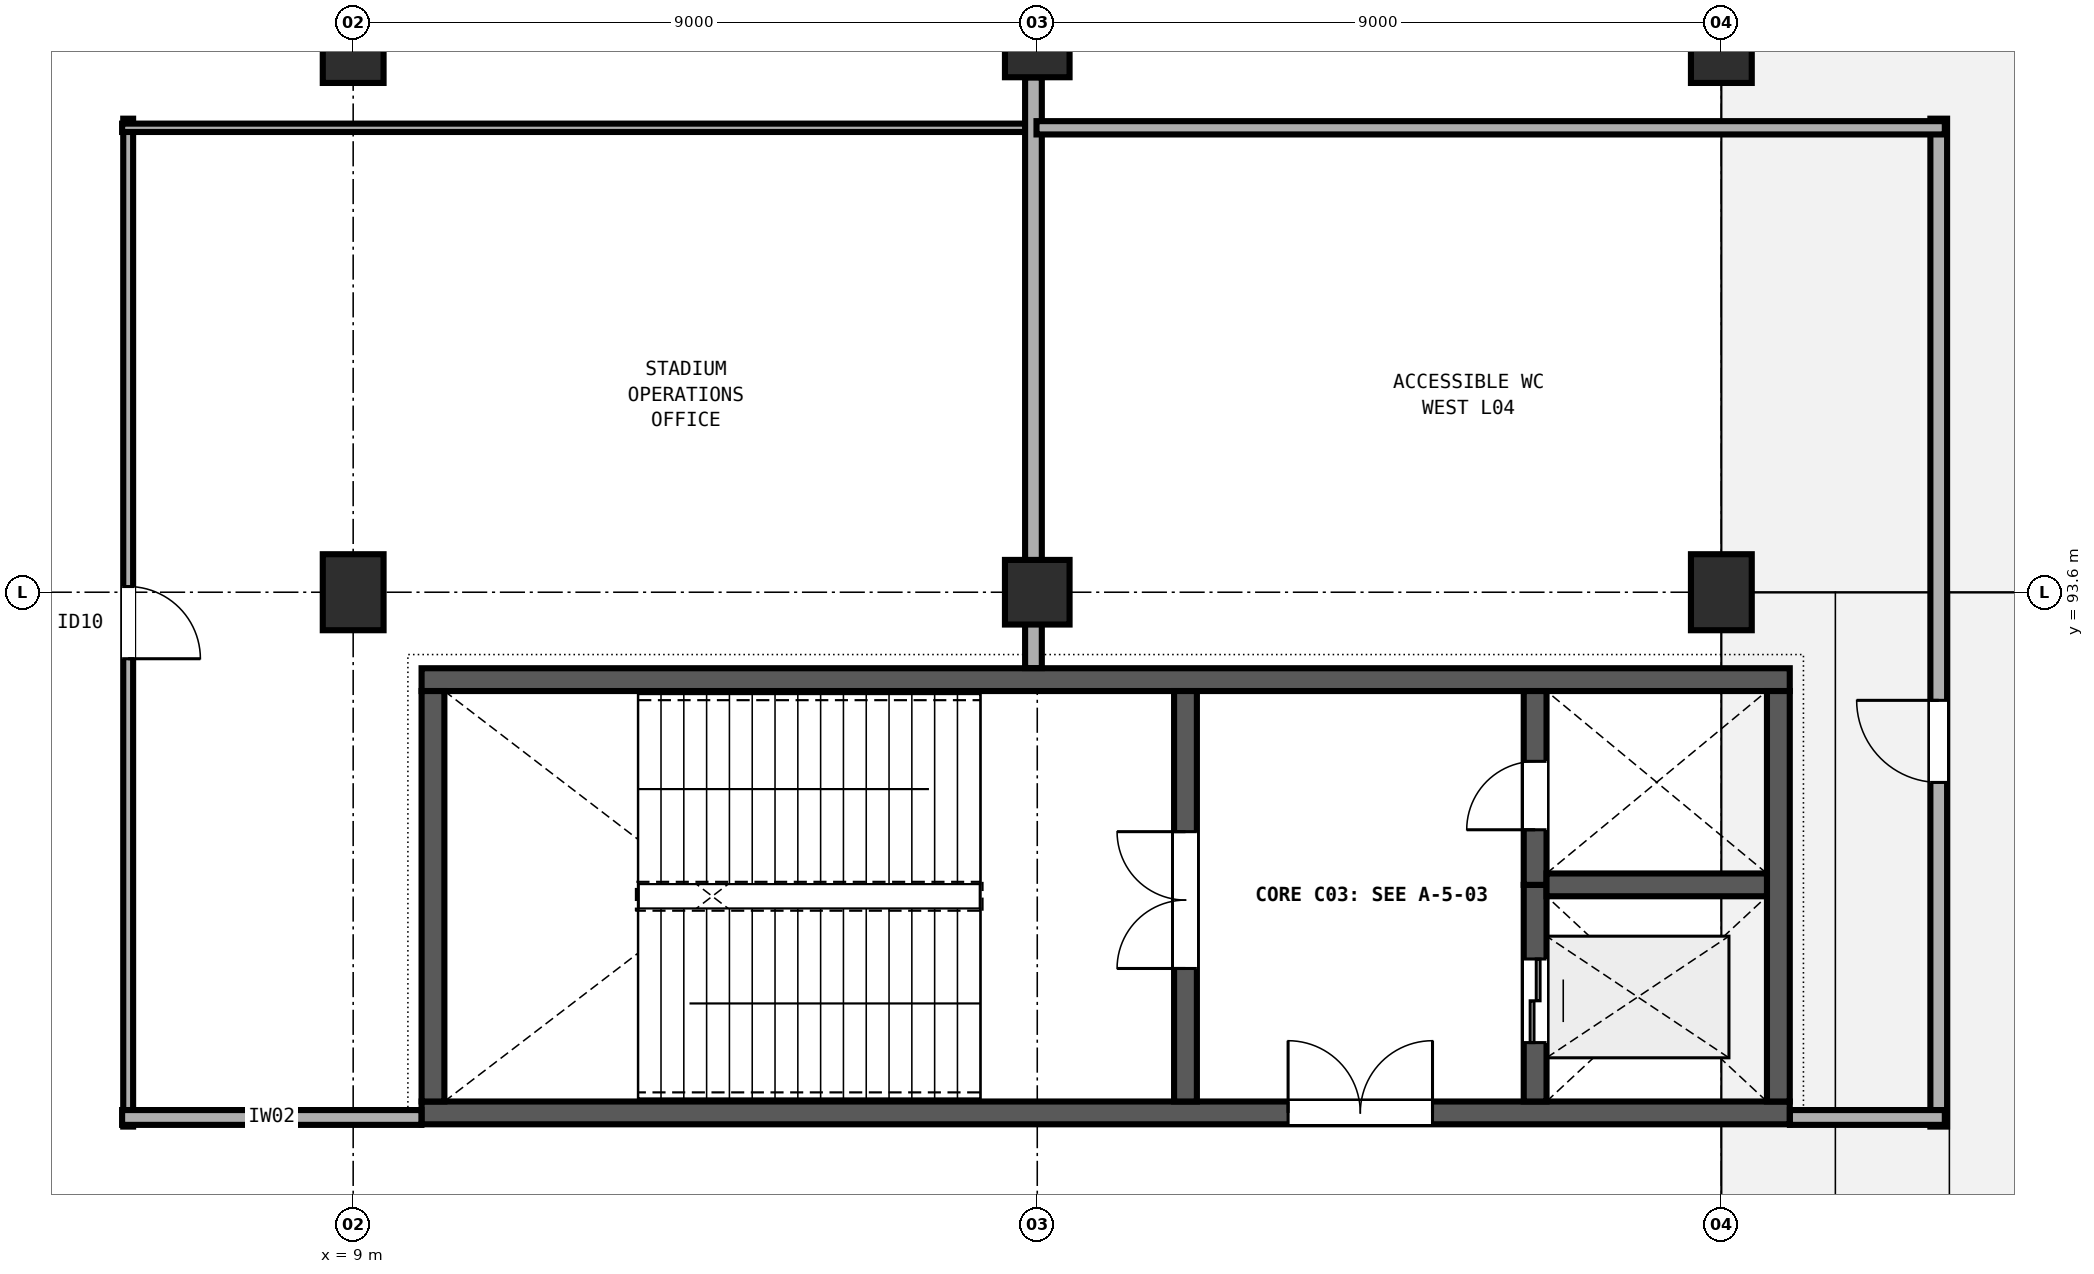
"""IFC4 building model, lengths in metres.
Left out: names, types, materials, properties, quantities, classifications, styles, units other than length and angle.
Written with IfcOpenShell. Run it as: python <this file> out.ifc"""

import sys

from ifc_helpers import new_model, si_unit, direction, frame, frame_2d, origin, origin_2d, place, context, subcontext, project, spatial, rectangle, extrude, element, fill, save


model = new_model("IFC4")
c1 = context("Model", 3, precision=1e-05, world=origin(), true_north=direction((0.0, 1.0)))
c2 = subcontext(c1, "Body", "Model", "MODEL_VIEW")
j1 = project(units=[si_unit("LENGTHUNIT", "METRE"), si_unit("PLANEANGLEUNIT", "RADIAN")], contexts=[c1])
p1 = place(None, origin())
s1 = spatial("IfcSite", under=j1, at=p1, CompositionType="ELEMENT")
p2 = place(p1, origin())
s2 = spatial("IfcBuilding", under=s1, at=p2, CompositionType="ELEMENT")
p3 = place(p2, frame((0.0, 0.0, 19.2)))
s3 = spatial("IfcBuildingStorey", under=s2, at=p3, CompositionType="ELEMENT", Elevation=19.2)
for number, where, z_axis, x_axis in (
    (1, (9.0, 93.6, 0.0), (0.0, 0.0, 1.0), (1.0, 0.0, 0.0)),
    (2, (9.0, 100.8, 0.0), (0.0, 0.0, 1.0), (1.0, 0.0, 0.0)),
):
    element("IfcColumn", number, at=place(p3, frame(where, z_axis=z_axis, x_axis=x_axis)), inside=s3, PredefinedType="COLUMN", context=c2, shape_type="SweptSolid", body=[
        extrude(rectangle(XDim=0.8, YDim=1.0, at=origin_2d()), origin(), (0.0, 0.0, 1.0), 4.8),
    ])
for number, where, z_axis, x_axis in (
    (3, (18.0, 93.6, 0.0), (0.0, 0.0, 1.0), (1.0, 0.0, 0.0)),
    (4, (18.0, 100.8, 0.0), (0.0, 0.0, 1.0), (1.0, 0.0, 0.0)),
):
    element("IfcColumn", number, at=place(p3, frame(where, z_axis=z_axis, x_axis=x_axis)), inside=s3, PredefinedType="COLUMN", context=c2, shape_type="SweptSolid", body=[
        extrude(rectangle(XDim=0.85, YDim=0.85, at=origin_2d()), origin(), (0.0, 0.0, 1.0), 4.8),
    ])
for number, where, z_axis, x_axis in (
    (5, (27.0, 93.6, 0.0), (0.0, 0.0, 1.0), (1.0, 0.0, 0.0)),
    (6, (27.0, 100.8, 0.0), (0.0, 0.0, 1.0), (1.0, 0.0, 0.0)),
):
    element("IfcColumn", number, at=place(p3, frame(where, z_axis=z_axis, x_axis=x_axis)), inside=s3, PredefinedType="COLUMN", context=c2, shape_type="SweptSolid", body=[
        extrude(rectangle(XDim=0.8, YDim=1.0, at=origin_2d()), origin(), (0.0, 0.0, 1.0), 4.8),
    ])
p4 = place(p3, frame((9.9, 86.75, 0.0), z_axis=(0.0, 0.0, 1.0), x_axis=(1.0, 0.0, 0.0)))
e7 = element("IfcWall", 7, at=p4, inside=s3, PredefinedType="SHEAR", context=c2, shape_type="SweptSolid", body=[
    extrude(rectangle(XDim=18.0, YDim=0.3, at=frame_2d((9.0, 0.0))), origin(), (0.0, 0.0, 1.0), 4.55),
])
p5 = place(p4, frame((11.4, 0.0, 0.0)))
e8 = element("IfcOpeningElement", 8, at=p5, cuts=e7, PredefinedType="OPENING", context=c2, shape_type="SweptSolid", body=[
    extrude(rectangle(XDim=1.9, YDim=2.25, at=frame_2d((0.95, 1.125))), frame((0.0, 0.16, 0.0), z_axis=(0.0, -1.0, 0.0), x_axis=(1.0, 0.0, 0.0)), (0.0, 0.0, 1.0), 0.32),
])
p6 = place(p3, frame((27.9, 92.45, 0.0), z_axis=(0.0, 0.0, 1.0), x_axis=(-1.0, 0.0, 0.0)))
e9 = element("IfcWall", 9, at=p6, inside=s3, PredefinedType="SHEAR", context=c2, shape_type="SweptSolid", body=[
    extrude(rectangle(XDim=18.0, YDim=0.3, at=frame_2d((9.0, 0.0))), origin(), (0.0, 0.0, 1.0), 4.55),
])
for number, where, z_axis, x_axis in (
    (10, (10.05, 92.3, 0.0), (0.0, 0.0, 1.0), (0.0, -1.0, 0.0)),
    (11, (27.75, 86.9, 0.0), (0.0, 0.0, 1.0), (0.0, 1.0, 0.0)),
):
    element("IfcWall", number, at=place(p3, frame(where, z_axis=z_axis, x_axis=x_axis)), inside=s3, PredefinedType="SHEAR", context=c2, shape_type="SweptSolid", body=[
        extrude(rectangle(XDim=5.4, YDim=0.3, at=frame_2d((2.7, 0.0))), origin(), (0.0, 0.0, 1.0), 4.55),
    ])
p7 = place(p3, frame((19.95, 86.9, 0.0), z_axis=(0.0, 0.0, 1.0), x_axis=(0.0, 1.0, 0.0)))
e12 = element("IfcWall", 12, at=p7, inside=s3, PredefinedType="SHEAR", context=c2, shape_type="SweptSolid", body=[
    extrude(rectangle(XDim=5.4, YDim=0.3, at=frame_2d((2.7, 0.0))), origin(), (0.0, 0.0, 1.0), 4.55),
])
p8 = place(p7, frame((1.75, 0.0, 0.0)))
e13 = element("IfcOpeningElement", 13, at=p8, cuts=e12, PredefinedType="OPENING", context=c2, shape_type="SweptSolid", body=[
    extrude(rectangle(XDim=1.8, YDim=2.25, at=frame_2d((0.9, 1.125))), frame((0.0, 0.16, 0.0), z_axis=(0.0, -1.0, 0.0), x_axis=(1.0, 0.0, 0.0)), (0.0, 0.0, 1.0), 0.32),
])
p9 = place(p3, frame((24.55, 86.9, 0.0), z_axis=(0.0, 0.0, 1.0), x_axis=(0.0, 1.0, 0.0)))
e14 = element("IfcWall", 14, at=p9, inside=s3, PredefinedType="SHEAR", context=c2, shape_type="SweptSolid", body=[
    extrude(rectangle(XDim=2.85, YDim=0.3, at=frame_2d((1.425, 0.0))), origin(), (0.0, 0.0, 1.0), 4.55),
])
p10 = place(p9, frame((0.775, 0.0, 0.0)))
e15 = element("IfcOpeningElement", 15, at=p10, cuts=e14, PredefinedType="OPENING", context=c2, shape_type="SweptSolid", body=[
    extrude(rectangle(XDim=1.1, YDim=2.1, at=frame_2d((0.55, 1.05))), frame((0.0, 0.16, 0.0), z_axis=(0.0, -1.0, 0.0), x_axis=(1.0, 0.0, 0.0)), (0.0, 0.0, 1.0), 0.32),
])
p11 = place(p3, frame((24.55, 89.75, 0.0), z_axis=(0.0, 0.0, 1.0), x_axis=(0.0, 1.0, 0.0)))
e16 = element("IfcWall", 16, at=p11, inside=s3, PredefinedType="SHEAR", context=c2, shape_type="SweptSolid", body=[
    extrude(rectangle(XDim=2.55, YDim=0.3, at=frame_2d((1.275, 0.0))), origin(), (0.0, 0.0, 1.0), 4.55),
])
p12 = place(p11, frame((0.725, 0.0, 0.0)))
e17 = element("IfcOpeningElement", 17, at=p12, cuts=e16, PredefinedType="OPENING", context=c2, shape_type="SweptSolid", body=[
    extrude(rectangle(XDim=0.9, YDim=2.1, at=frame_2d((0.45, 1.05))), frame((0.0, 0.16, 0.0), z_axis=(0.0, -1.0, 0.0), x_axis=(1.0, 0.0, 0.0)), (0.0, 0.0, 1.0), 0.32),
])
p13 = place(p3, frame((24.7, 89.75, 0.0), z_axis=(0.0, 0.0, 1.0), x_axis=(1.0, 0.0, 0.0)))
e18 = element("IfcWall", 18, at=p13, inside=s3, PredefinedType="SHEAR", context=c2, shape_type="SweptSolid", body=[
    extrude(rectangle(XDim=2.9, YDim=0.3, at=frame_2d((1.45, 0.0))), origin(), (0.0, 0.0, 1.0), 4.55),
])
p14 = place(p3, frame((6.04, 99.83, 0.0), z_axis=(0.0, 0.0, 1.0), x_axis=(0.0, -1.0, 0.0)))
e19 = element("IfcWall", 19, at=p14, inside=s3, PredefinedType="PARTITIONING", context=c2, shape_type="SweptSolid", body=[
    extrude(rectangle(XDim=13.26, YDim=0.13, at=frame_2d((6.63, 0.0))), origin(), (0.0, 0.0, 1.0), 3.28),
])
p15 = place(p14, frame((6.155, 0.0, 0.0)))
e20 = element("IfcOpeningElement", 20, at=p15, cuts=e19, PredefinedType="OPENING", context=c2, shape_type="SweptSolid", body=[
    extrude(rectangle(XDim=0.95, YDim=2.18, at=frame_2d((0.475, 1.09))), frame((0.0, 0.075, 0.0), z_axis=(0.0, -1.0, 0.0), x_axis=(1.0, 0.0, 0.0)), (0.0, 0.0, 1.0), 0.15),
])
p16 = place(p3, frame((5.96, 99.71, 0.0), z_axis=(0.0, 0.0, 1.0), x_axis=(1.0, 0.0, 0.0)))
e21 = element("IfcWall", 21, at=p16, inside=s3, PredefinedType="PARTITIONING", context=c2, shape_type="SweptSolid", body=[
    extrude(rectangle(XDim=11.95, YDim=0.11, at=frame_2d((5.975, 0.0))), origin(), (0.0, 0.0, 1.0), 3.28),
])
p17 = place(p3, frame((17.95, 100.373, 0.0), z_axis=(0.0, 0.0, 1.0), x_axis=(0.0, -1.0, 0.0)))
e22 = element("IfcWall", 22, at=p17, inside=s3, PredefinedType="PARTITIONING", context=c2, shape_type="SweptSolid", body=[
    extrude(rectangle(XDim=7.771, YDim=0.22, at=frame_2d((3.885, 0.0))), origin(), (0.0, 0.0, 1.0), 3.28),
])
p18 = place(p3, frame((9.898, 86.69, 0.0), z_axis=(0.0, 0.0, 1.0), x_axis=(-1.0, 0.0, 0.0)))
e23 = element("IfcWall", 23, at=p18, inside=s3, PredefinedType="PARTITIONING", context=c2, shape_type="SweptSolid", body=[
    extrude(rectangle(XDim=3.938, YDim=0.195, at=frame_2d((1.969, 0.0))), origin(), (0.0, 0.0, 1.0), 3.28),
])
p19 = place(p3, frame((29.86, 86.57, 0.0), z_axis=(0.0, 0.0, 1.0), x_axis=(0.0, 1.0, 0.0)))
e24 = element("IfcWall", 24, at=p19, inside=s3, PredefinedType="PARTITIONING", context=c2, shape_type="SweptSolid", body=[
    extrude(rectangle(XDim=13.26, YDim=0.22, at=frame_2d((6.63, 0.0))), origin(), (0.0, 0.0, 1.0), 3.28),
])
p20 = place(p19, frame((4.528, 0.0, 0.0)))
e25 = element("IfcOpeningElement", 25, at=p20, cuts=e24, PredefinedType="OPENING", context=c2, shape_type="SweptSolid", body=[
    extrude(rectangle(XDim=1.08, YDim=2.18, at=frame_2d((0.54, 1.09))), frame((0.0, 0.12, 0.0), z_axis=(0.0, -1.0, 0.0), x_axis=(1.0, 0.0, 0.0)), (0.0, 0.0, 1.0), 0.24),
])
p21 = place(p3, frame((29.94, 86.69, 0.0), z_axis=(0.0, 0.0, 1.0), x_axis=(-1.0, 0.0, 0.0)))
e26 = element("IfcWall", 26, at=p21, inside=s3, PredefinedType="PARTITIONING", context=c2, shape_type="SweptSolid", body=[
    extrude(rectangle(XDim=2.038, YDim=0.195, at=frame_2d((1.019, 0.0))), origin(), (0.0, 0.0, 1.0), 3.28),
])
p22 = place(p3, frame((17.99, 99.71, 0.0), z_axis=(0.0, 0.0, 1.0), x_axis=(1.0, 0.0, 0.0)))
e27 = element("IfcWall", 27, at=p22, inside=s3, PredefinedType="PARTITIONING", context=c2, shape_type="SweptSolid", body=[
    extrude(rectangle(XDim=11.95, YDim=0.175, at=frame_2d((5.975, 0.0))), origin(), (0.0, 0.0, 1.0), 3.28),
])
p23 = place(p8, origin())
e28 = element("IfcDoor", 28, at=p23, inside=s3, OperationType="DOUBLE_DOOR_SINGLE_SWING", PredefinedType="DOOR", context=c2, shape_type="SweptSolid", body=[
    extrude(rectangle(XDim=1.8, YDim=2.25, at=frame_2d((0.9, 1.125))), frame((0.0, 0.025, 0.0), z_axis=(0.0, -1.0, 0.0), x_axis=(1.0, 0.0, 0.0)), (0.0, 0.0, 1.0), 0.05),
])
fill(e13, e28)
p24 = place(p12, origin())
e29 = element("IfcDoor", 29, at=p24, inside=s3, OperationType="SINGLE_SWING_LEFT", PredefinedType="DOOR", context=c2, shape_type="SweptSolid", body=[
    extrude(rectangle(XDim=0.9, YDim=2.1, at=frame_2d((0.45, 1.05))), frame((0.0, 0.025, 0.0), z_axis=(0.0, -1.0, 0.0), x_axis=(1.0, 0.0, 0.0)), (0.0, 0.0, 1.0), 0.05),
])
fill(e17, e29)
p25 = place(p10, origin())
e30 = element("IfcDoor", 30, at=p25, inside=s3, OperationType="DOUBLE_DOOR_SLIDING", PredefinedType="DOOR", context=c2, shape_type="SweptSolid", body=[
    extrude(rectangle(XDim=1.1, YDim=2.1, at=frame_2d((0.55, 1.05))), frame((0.0, 0.025, 0.0), z_axis=(0.0, -1.0, 0.0), x_axis=(1.0, 0.0, 0.0)), (0.0, 0.0, 1.0), 0.05),
])
fill(e15, e30)
p26 = place(p5, origin())
e31 = element("IfcDoor", 31, at=p26, inside=s3, OperationType="DOUBLE_DOOR_SINGLE_SWING", PredefinedType="DOOR", context=c2, shape_type="SweptSolid", body=[
    extrude(rectangle(XDim=1.9, YDim=2.25, at=frame_2d((0.95, 1.125))), frame((0.0, 0.025, 0.0), z_axis=(0.0, -1.0, 0.0), x_axis=(1.0, 0.0, 0.0)), (0.0, 0.0, 1.0), 0.05),
])
fill(e8, e31)
p27 = place(p15, origin())
e32 = element("IfcDoor", 32, at=p27, inside=s3, OperationType="SINGLE_SWING_RIGHT", PredefinedType="DOOR", context=c2, shape_type="SweptSolid", body=[
    extrude(rectangle(XDim=0.95, YDim=2.18, at=frame_2d((0.475, 1.09))), frame((0.0, 0.025, 0.0), z_axis=(0.0, -1.0, 0.0), x_axis=(1.0, 0.0, 0.0)), (0.0, 0.0, 1.0), 0.05),
])
fill(e20, e32)
p28 = place(p20, origin())
e33 = element("IfcDoor", 33, at=p28, inside=s3, OperationType="SINGLE_SWING_RIGHT", PredefinedType="DOOR", context=c2, shape_type="SweptSolid", body=[
    extrude(rectangle(XDim=1.08, YDim=2.18, at=frame_2d((0.54, 1.09))), frame((0.0, 0.025, 0.0), z_axis=(0.0, -1.0, 0.0), x_axis=(1.0, 0.0, 0.0)), (0.0, 0.0, 1.0), 0.05),
])
fill(e25, e33)
save(model, sys.argv[1])
